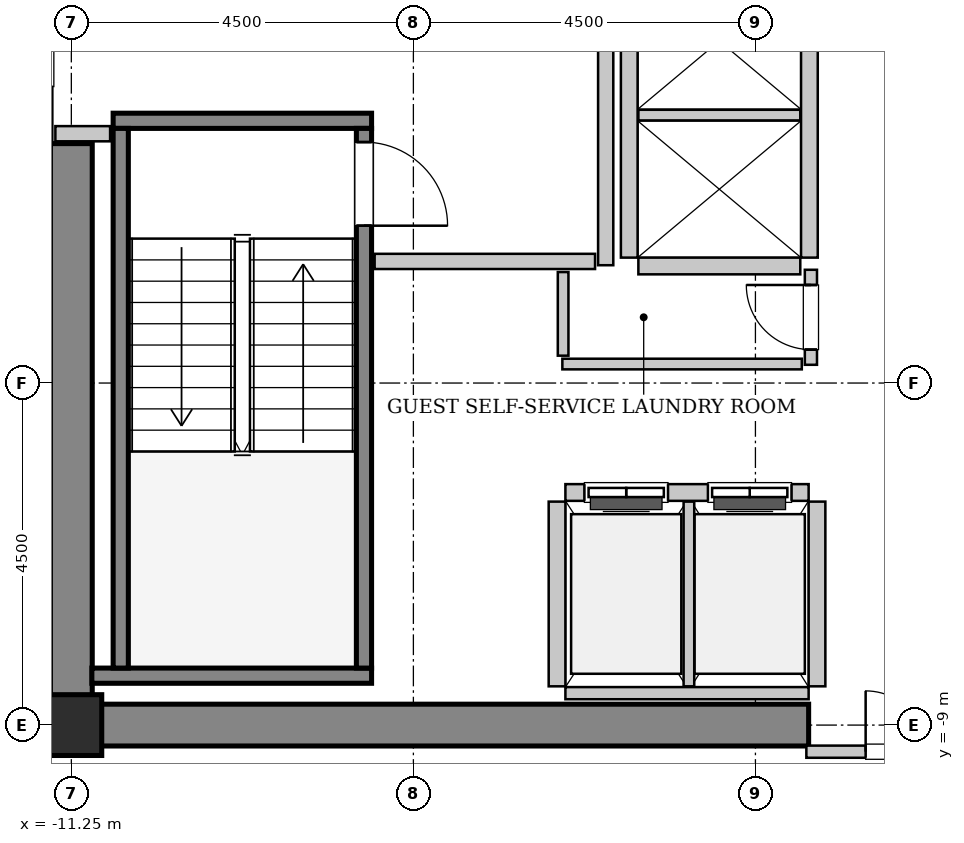
"""IFC4 building model, lengths in metres.
Left out: names, types, materials, properties, quantities, classifications, styles, units other than length and angle.
Written with IfcOpenShell. Run it as: python <this file> out.ifc"""

import sys

from ifc_helpers import new_model, si_unit, direction, frame, frame_2d, origin, origin_2d, place, context, subcontext, project, spatial, rectangle, hollow_rectangle, extrude, source, transform, mapped, element, fill, save


model = new_model("IFC4")
c1 = context("Model", 3, precision=1e-05, world=origin(), true_north=direction((0.0, 1.0)))
c2 = subcontext(c1, "Body", "Model", "MODEL_VIEW")
j1 = project(units=[si_unit("LENGTHUNIT", "METRE"), si_unit("PLANEANGLEUNIT", "RADIAN")], contexts=[c1])
p1 = place(None, origin())
s1 = spatial("IfcSite", under=j1, at=p1, CompositionType="ELEMENT")
p2 = place(p1, origin())
s2 = spatial("IfcBuilding", under=s1, at=p2, CompositionType="ELEMENT")
p3 = place(p2, frame((0.0, 0.0, 186.8)))
s3 = spatial("IfcBuildingStorey", under=s2, at=p3, CompositionType="ELEMENT", Elevation=186.8)
m1 = source(origin(), c2, "Body", "SweptSolid", [
    extrude(rectangle(XDim=9.975, YDim=0.55, at=frame_2d((4.987, 0.0))), origin(), (0.0, 0.0, 1.0), 3.8),
])
p4 = place(p3, frame((-11.525, -9.0, 0.0), z_axis=(0.0, 0.0, 1.0), x_axis=(1.0, 0.0, 0.0)))
e1 = element("IfcWall", 1, at=p4, inside=s3, PredefinedType="SHEAR", context=c2, shape_type="MappedRepresentation", body=[
    mapped(m1, transform((0.0, 0.0, 0.0), x_axis=(1.0, 0.0, 0.0), y_axis=(0.0, 1.0, 0.0), z_axis=(0.0, 0.0, 1.0), scale=1.0)),
])
m2 = source(origin(), c2, "Body", "SweptSolid", [
    extrude(rectangle(XDim=7.375, YDim=0.55, at=frame_2d((3.688, 0.0))), origin(), (0.0, 0.0, 1.0), 3.8),
])
p5 = place(p3, frame((-11.25, -8.725, 0.0), z_axis=(0.0, 0.0, 1.0), x_axis=(0.0, 1.0, 0.0)))
e2 = element("IfcWall", 2, at=p5, inside=s3, PredefinedType="SHEAR", context=c2, shape_type="MappedRepresentation", body=[
    mapped(m2, transform((0.0, 0.0, 0.0), x_axis=(1.0, 0.0, 0.0), y_axis=(0.0, 1.0, 0.0), z_axis=(0.0, 0.0, 1.0), scale=1.0)),
])
m3 = source(origin(), c2, "Body", "SweptSolid", [
    extrude(hollow_rectangle(XDim=0.8, YDim=0.8, WallThickness=0.04, InnerFilletRadius=0.04, OuterFilletRadius=0.08, at=origin_2d()), origin(), (0.0, 0.0, 1.0), 3.8),
])
p6 = place(p3, frame((-11.25, -9.0, 0.0), z_axis=(0.0, 0.0, 1.0), x_axis=(1.0, 0.0, 0.0)))
e3 = element("IfcColumn", 3, at=p6, inside=s3, PredefinedType="COLUMN", context=c2, shape_type="MappedRepresentation", body=[
    mapped(m3, transform((0.0, 0.0, 0.0), x_axis=(1.0, 0.0, 0.0), y_axis=(0.0, 1.0, 0.0), z_axis=(0.0, 0.0, 1.0), scale=1.0)),
])
m4 = source(origin(), c2, "Body", "SweptSolid", [
    extrude(rectangle(XDim=3.4, YDim=0.2, at=frame_2d((1.7, 0.0))), origin(), (0.0, 0.0, 1.0), 3.8),
])
p7 = place(p3, frame((-10.7, -1.05, 0.0), z_axis=(0.0, 0.0, 1.0), x_axis=(1.0, 0.0, 0.0)))
e4 = element("IfcWall", 4, at=p7, inside=s3, PredefinedType="SOLIDWALL", context=c2, shape_type="MappedRepresentation", body=[
    mapped(m4, transform((0.0, 0.0, 0.0), x_axis=(1.0, 0.0, 0.0), y_axis=(0.0, 1.0, 0.0), z_axis=(0.0, 0.0, 1.0), scale=1.0)),
])
m5 = source(origin(), c2, "Body", "SweptSolid", [
    extrude(rectangle(XDim=3.68, YDim=0.2, at=frame_2d((1.84, 0.0))), origin(), (0.0, 0.0, 1.0), 3.8),
])
p8 = place(p3, frame((-10.98, -8.35, 0.0), z_axis=(0.0, 0.0, 1.0), x_axis=(1.0, 0.0, 0.0)))
e5 = element("IfcWall", 5, at=p8, inside=s3, PredefinedType="SOLIDWALL", context=c2, shape_type="MappedRepresentation", body=[
    mapped(m5, transform((0.0, 0.0, 0.0), x_axis=(1.0, 0.0, 0.0), y_axis=(0.0, 1.0, 0.0), z_axis=(0.0, 0.0, 1.0), scale=1.0)),
])
m6 = source(origin(), c2, "Body", "SweptSolid", [
    extrude(rectangle(XDim=7.1, YDim=0.2, at=frame_2d((3.55, 0.0))), origin(), (0.0, 0.0, 1.0), 3.8),
])
p9 = place(p3, frame((-10.6, -1.15, 0.0), z_axis=(0.0, 0.0, 1.0), x_axis=(0.0, -1.0, 0.0)))
e6 = element("IfcWall", 6, at=p9, inside=s3, PredefinedType="SOLIDWALL", context=c2, shape_type="MappedRepresentation", body=[
    mapped(m6, transform((0.0, 0.0, 0.0), x_axis=(1.0, 0.0, 0.0), y_axis=(0.0, 1.0, 0.0), z_axis=(0.0, 0.0, 1.0), scale=1.0)),
])
p10 = place(p3, frame((-7.4, -1.15, 0.0), z_axis=(0.0, 0.0, 1.0), x_axis=(0.0, -1.0, 0.0)))
e7 = element("IfcWall", 7, at=p10, inside=s3, PredefinedType="SOLIDWALL", context=c2, shape_type="MappedRepresentation", body=[
    mapped(m6, transform((0.0, 0.0, 0.0), x_axis=(1.0, 0.0, 0.0), y_axis=(0.0, 1.0, 0.0), z_axis=(0.0, 0.0, 1.0), scale=1.0)),
])
p11 = place(p10, frame((0.18, 0.0, 0.0)))
e8 = element("IfcOpeningElement", 8, at=p11, cuts=e7, PredefinedType="OPENING", context=c2, shape_type="SweptSolid", body=[
    extrude(rectangle(XDim=1.1, YDim=2.15, at=frame_2d((0.55, 1.075))), frame((0.0, 0.11, 0.0), z_axis=(0.0, -1.0, 0.0), x_axis=(1.0, 0.0, 0.0)), (0.0, 0.0, 1.0), 0.22),
])
m7 = source(origin(), c2, "Body", "SweptSolid", [
    extrude(rectangle(XDim=3.2, YDim=0.22, at=frame_2d((1.6, 0.0))), origin(), (0.0, 0.0, 1.0), 3.535),
])
p12 = place(p3, frame((-1.55, -5.94, 0.0), z_axis=(0.0, 0.0, 1.0), x_axis=(-1.0, 0.0, 0.0)))
e9 = element("IfcWall", 9, at=p12, inside=s3, PredefinedType="SOLIDWALL", context=c2, shape_type="MappedRepresentation", body=[
    mapped(m7, transform((0.0, 0.0, 0.0), x_axis=(1.0, 0.0, 0.0), y_axis=(0.0, 1.0, 0.0), z_axis=(0.0, 0.0, 1.0), scale=1.0)),
])
p13 = place(p12, frame((1.85, 0.0, 0.0)))
e10 = element("IfcOpeningElement", 10, at=p13, cuts=e9, PredefinedType="OPENING", context=c2, shape_type="SweptSolid", body=[
    extrude(rectangle(XDim=1.1, YDim=2.2, at=frame_2d((0.55, 1.1))), frame((0.0, 0.12, 0.0), z_axis=(0.0, -1.0, 0.0), x_axis=(1.0, 0.0, 0.0)), (0.0, 0.0, 1.0), 0.24),
])
p14 = place(p12, frame((0.225, 0.0, 0.0)))
e11 = element("IfcOpeningElement", 11, at=p14, cuts=e9, PredefinedType="OPENING", context=c2, shape_type="SweptSolid", body=[
    extrude(rectangle(XDim=1.1, YDim=2.2, at=frame_2d((0.55, 1.1))), frame((0.0, 0.12, 0.0), z_axis=(0.0, -1.0, 0.0), x_axis=(1.0, 0.0, 0.0)), (0.0, 0.0, 1.0), 0.24),
])
m8 = source(origin(), c2, "Body", "SweptSolid", [
    extrude(rectangle(XDim=3.2, YDim=0.16, at=frame_2d((1.6, 0.0))), origin(), (0.0, 0.0, 1.0), 2.425),
])
p15 = place(p3, frame((-4.75, -8.58, 0.0), z_axis=(0.0, 0.0, 1.0), x_axis=(1.0, 0.0, 0.0)))
e12 = element("IfcWall", 12, at=p15, inside=s3, PredefinedType="PARTITIONING", context=c2, shape_type="MappedRepresentation", body=[
    mapped(m8, transform((0.0, 0.0, 0.0), x_axis=(1.0, 0.0, 0.0), y_axis=(0.0, 1.0, 0.0), z_axis=(0.0, 0.0, 1.0), scale=1.0)),
])
m9 = source(origin(), c2, "Body", "SweptSolid", [
    extrude(rectangle(XDim=2.43, YDim=0.22, at=frame_2d((1.215, 0.0))), origin(), (0.0, 0.0, 1.0), 3.535),
])
p16 = place(p3, frame((-4.86, -6.06, 0.0), z_axis=(0.0, 0.0, 1.0), x_axis=(0.0, -1.0, 0.0)))
e13 = element("IfcWall", 13, at=p16, inside=s3, PredefinedType="SOLIDWALL", context=c2, shape_type="MappedRepresentation", body=[
    mapped(m9, transform((0.0, 0.0, 0.0), x_axis=(1.0, 0.0, 0.0), y_axis=(0.0, 1.0, 0.0), z_axis=(0.0, 0.0, 1.0), scale=1.0)),
])
m10 = source(origin(), c2, "Body", "SweptSolid", [
    extrude(rectangle(XDim=2.43, YDim=0.14, at=frame_2d((1.215, 0.0))), origin(), (0.0, 0.0, 1.0), 3.535),
])
p17 = place(p3, frame((-3.125, -8.49, 0.0), z_axis=(0.0, 0.0, 1.0), x_axis=(0.0, 1.0, 0.0)))
e14 = element("IfcWall", 14, at=p17, inside=s3, PredefinedType="PARTITIONING", context=c2, shape_type="MappedRepresentation", body=[
    mapped(m10, transform((0.0, 0.0, 0.0), x_axis=(1.0, 0.0, 0.0), y_axis=(0.0, 1.0, 0.0), z_axis=(0.0, 0.0, 1.0), scale=1.0)),
])
p18 = place(p3, frame((-1.44, -8.49, 0.0), z_axis=(0.0, 0.0, 1.0), x_axis=(0.0, 1.0, 0.0)))
e15 = element("IfcWall", 15, at=p18, inside=s3, PredefinedType="SOLIDWALL", context=c2, shape_type="MappedRepresentation", body=[
    mapped(m9, transform((0.0, 0.0, 0.0), x_axis=(1.0, 0.0, 0.0), y_axis=(0.0, 1.0, 0.0), z_axis=(0.0, 0.0, 1.0), scale=1.0)),
])
m11 = source(origin(), c2, "Body", "SweptSolid", [
    extrude(rectangle(XDim=5.7, YDim=0.22, at=frame_2d((2.85, 0.0))), origin(), (0.0, 0.0, 1.0), 3.535),
])
for number, where, z_axis, x_axis in (
    (16, (-1.54, -2.85, 0.0), (0.0, 0.0, 1.0), (0.0, 1.0, 0.0)),
    (17, (-3.91, 2.85, 0.0), (0.0, 0.0, 1.0), (0.0, -1.0, 0.0)),
):
    element("IfcWall", number, at=place(p3, frame(where, z_axis=z_axis, x_axis=x_axis)), inside=s3, PredefinedType="SOLIDWALL", context=c2, shape_type="MappedRepresentation", body=[
        mapped(m11, transform((0.0, 0.0, 0.0), x_axis=(1.0, 0.0, 0.0), y_axis=(0.0, 1.0, 0.0), z_axis=(0.0, 0.0, 1.0), scale=1.0)),
    ])
m12 = source(origin(), c2, "Body", "SweptSolid", [
    extrude(rectangle(XDim=2.13, YDim=0.22, at=frame_2d((1.065, 0.0))), origin(), (0.0, 0.0, 1.0), 3.535),
])
p19 = place(p3, frame((-3.79, -2.96, 0.0), z_axis=(0.0, 0.0, 1.0), x_axis=(1.0, 0.0, 0.0)))
e18 = element("IfcWall", 18, at=p19, inside=s3, PredefinedType="SOLIDWALL", context=c2, shape_type="MappedRepresentation", body=[
    mapped(m12, transform((0.0, 0.0, 0.0), x_axis=(1.0, 0.0, 0.0), y_axis=(0.0, 1.0, 0.0), z_axis=(0.0, 0.0, 1.0), scale=1.0)),
])
m13 = source(origin(), c2, "Body", "SweptSolid", [
    extrude(rectangle(XDim=2.13, YDim=0.14, at=frame_2d((1.065, 0.0))), origin(), (0.0, 0.0, 1.0), 3.535),
])
p20 = place(p3, frame((-3.79, -0.975, 0.0), z_axis=(0.0, 0.0, 1.0), x_axis=(1.0, 0.0, 0.0)))
e19 = element("IfcWall", 19, at=p20, inside=s3, PredefinedType="PARTITIONING", context=c2, shape_type="MappedRepresentation", body=[
    mapped(m13, transform((0.0, 0.0, 0.0), x_axis=(1.0, 0.0, 0.0), y_axis=(0.0, 1.0, 0.0), z_axis=(0.0, 0.0, 1.0), scale=1.0)),
])
m14 = source(origin(), c2, "Body", "SweptSolid", [
    extrude(rectangle(XDim=5.9, YDim=0.2, at=frame_2d((2.95, 0.0))), origin(), (0.0, 0.0, 1.0), 3.535),
])
p21 = place(p3, frame((-4.22, -2.95, 0.0), z_axis=(0.0, 0.0, 1.0), x_axis=(0.0, 1.0, 0.0)))
e20 = element("IfcWall", 20, at=p21, inside=s3, PredefinedType="PARTITIONING", context=c2, shape_type="MappedRepresentation", body=[
    mapped(m14, transform((0.0, 0.0, 0.0), x_axis=(1.0, 0.0, 0.0), y_axis=(0.0, 1.0, 0.0), z_axis=(0.0, 0.0, 1.0), scale=1.0)),
])
m15 = source(origin(), c2, "Body", "SweptSolid", [
    extrude(rectangle(XDim=2.9, YDim=0.2, at=frame_2d((1.45, 0.0))), origin(), (0.0, 0.0, 1.0), 3.535),
])
p22 = place(p3, frame((-7.26, -2.9, 0.0), z_axis=(0.0, 0.0, 1.0), x_axis=(1.0, 0.0, 0.0)))
e21 = element("IfcWall", 21, at=p22, inside=s3, PredefinedType="PARTITIONING", context=c2, shape_type="MappedRepresentation", body=[
    mapped(m15, transform((0.0, 0.0, 0.0), x_axis=(1.0, 0.0, 0.0), y_axis=(0.0, 1.0, 0.0), z_axis=(0.0, 0.0, 1.0), scale=1.0)),
])
m16 = source(origin(), c2, "Body", "SweptSolid", [
    extrude(rectangle(XDim=0.72, YDim=0.2, at=frame_2d((0.36, 0.0))), origin(), (0.0, 0.0, 1.0), 3.535),
])
p23 = place(p3, frame((-11.46, -1.22, 0.0), z_axis=(0.0, 0.0, 1.0), x_axis=(1.0, 0.0, 0.0)))
e22 = element("IfcWall", 22, at=p23, inside=s3, PredefinedType="PARTITIONING", context=c2, shape_type="MappedRepresentation", body=[
    mapped(m16, transform((0.0, 0.0, 0.0), x_axis=(1.0, 0.0, 0.0), y_axis=(0.0, 1.0, 0.0), z_axis=(0.0, 0.0, 1.0), scale=1.0)),
])
m17 = source(origin(), c2, "Body", "SweptSolid", [
    extrude(rectangle(XDim=3.16, YDim=0.16, at=frame_2d((1.58, 0.0))), origin(), (0.0, 0.0, 1.0), 2.425),
])
p24 = place(p3, frame((-1.58, -9.35, 0.0), z_axis=(0.0, 0.0, 1.0), x_axis=(1.0, 0.0, 0.0)))
e23 = element("IfcWall", 23, at=p24, inside=s3, PredefinedType="PARTITIONING", context=c2, shape_type="MappedRepresentation", body=[
    mapped(m17, transform((0.0, 0.0, 0.0), x_axis=(1.0, 0.0, 0.0), y_axis=(0.0, 1.0, 0.0), z_axis=(0.0, 0.0, 1.0), scale=1.0)),
])
p25 = place(p24, frame((0.78, 0.0, 0.0)))
e24 = element("IfcOpeningElement", 24, at=p25, cuts=e23, PredefinedType="OPENING", context=c2, shape_type="SweptSolid", body=[
    extrude(rectangle(XDim=1.6, YDim=2.3, at=frame_2d((0.8, 1.15))), frame((0.0, 0.09, 0.0), z_axis=(0.0, -1.0, 0.0), x_axis=(1.0, 0.0, 0.0)), (0.0, 0.0, 1.0), 0.18),
])
m18 = source(origin(), c2, "Body", "SweptSolid", [
    extrude(rectangle(XDim=1.25, YDim=0.16, at=frame_2d((0.625, 0.0))), origin(), (0.0, 0.0, 1.0), 3.535),
])
p26 = place(p3, frame((-1.52, -4.26, 0.0), z_axis=(0.0, 0.0, 1.0), x_axis=(0.0, 1.0, 0.0)))
e25 = element("IfcWall", 25, at=p26, inside=s3, PredefinedType="PARTITIONING", context=c2, shape_type="MappedRepresentation", body=[
    mapped(m18, transform((0.0, 0.0, 0.0), x_axis=(1.0, 0.0, 0.0), y_axis=(0.0, 1.0, 0.0), z_axis=(0.0, 0.0, 1.0), scale=1.0)),
])
p27 = place(p26, frame((0.2, 0.0, 0.0)))
e26 = element("IfcOpeningElement", 26, at=p27, cuts=e25, PredefinedType="OPENING", context=c2, shape_type="SweptSolid", body=[
    extrude(rectangle(XDim=0.85, YDim=2.1, at=frame_2d((0.425, 1.05))), frame((0.0, 0.09, 0.0), z_axis=(0.0, -1.0, 0.0), x_axis=(1.0, 0.0, 0.0)), (0.0, 0.0, 1.0), 0.18),
])
m19 = source(origin(), c2, "Body", "SweptSolid", [
    extrude(rectangle(XDim=3.15, YDim=0.14, at=frame_2d((1.575, 0.0))), origin(), (0.0, 0.0, 1.0), 3.535),
])
p28 = place(p3, frame((-4.79, -4.25, 0.0), z_axis=(0.0, 0.0, 1.0), x_axis=(1.0, 0.0, 0.0)))
e27 = element("IfcWall", 27, at=p28, inside=s3, PredefinedType="PARTITIONING", context=c2, shape_type="MappedRepresentation", body=[
    mapped(m19, transform((0.0, 0.0, 0.0), x_axis=(1.0, 0.0, 0.0), y_axis=(0.0, 1.0, 0.0), z_axis=(0.0, 0.0, 1.0), scale=1.0)),
])
m20 = source(origin(), c2, "Body", "SweptSolid", [
    extrude(rectangle(XDim=1.1, YDim=0.14, at=frame_2d((0.55, 0.0))), origin(), (0.0, 0.0, 1.0), 3.535),
])
p29 = place(p3, frame((-4.78, -4.14, 0.0), z_axis=(0.0, 0.0, 1.0), x_axis=(0.0, 1.0, 0.0)))
e28 = element("IfcWall", 28, at=p29, inside=s3, PredefinedType="PARTITIONING", context=c2, shape_type="MappedRepresentation", body=[
    mapped(m20, transform((0.0, 0.0, 0.0), x_axis=(1.0, 0.0, 0.0), y_axis=(0.0, 1.0, 0.0), z_axis=(0.0, 0.0, 1.0), scale=1.0)),
])
m21 = source(origin(), c2, "Body", "SweptSolid", [
    extrude(rectangle(XDim=1.1, YDim=2.15, at=frame_2d((0.55, 1.075))), frame((0.0, 0.025, 0.0), z_axis=(0.0, -1.0, 0.0), x_axis=(1.0, 0.0, 0.0)), (0.0, 0.0, 1.0), 0.05),
])
p30 = place(p11, origin())
e29 = element("IfcDoor", 29, at=p30, inside=s3, OperationType="SINGLE_SWING_RIGHT", PredefinedType="DOOR", context=c2, shape_type="MappedRepresentation", body=[
    mapped(m21, transform((0.0, 0.0, 0.0), x_axis=(1.0, 0.0, 0.0), y_axis=(0.0, 1.0, 0.0), z_axis=(0.0, 0.0, 1.0), scale=1.0)),
])
fill(e8, e29)
m22 = source(origin(), c2, "Body", "SweptSolid", [
    extrude(rectangle(XDim=1.1, YDim=2.2, at=frame_2d((0.55, 1.1))), frame((0.0, 0.025, 0.0), z_axis=(0.0, -1.0, 0.0), x_axis=(1.0, 0.0, 0.0)), (0.0, 0.0, 1.0), 0.05),
])
p31 = place(p13, origin())
e30 = element("IfcDoor", 30, at=p31, inside=s3, OperationType="DOUBLE_DOOR_SLIDING", PredefinedType="DOOR", context=c2, shape_type="MappedRepresentation", body=[
    mapped(m22, transform((0.0, 0.0, 0.0), x_axis=(1.0, 0.0, 0.0), y_axis=(0.0, 1.0, 0.0), z_axis=(0.0, 0.0, 1.0), scale=1.0)),
])
fill(e10, e30)
p32 = place(p14, origin())
e31 = element("IfcDoor", 31, at=p32, inside=s3, OperationType="DOUBLE_DOOR_SLIDING", PredefinedType="DOOR", context=c2, shape_type="MappedRepresentation", body=[
    mapped(m22, transform((0.0, 0.0, 0.0), x_axis=(1.0, 0.0, 0.0), y_axis=(0.0, 1.0, 0.0), z_axis=(0.0, 0.0, 1.0), scale=1.0)),
])
fill(e11, e31)
m23 = source(origin(), c2, "Body", "SweptSolid", [
    extrude(rectangle(XDim=1.6, YDim=2.3, at=frame_2d((0.8, 1.15))), frame((0.0, 0.025, 0.0), z_axis=(0.0, -1.0, 0.0), x_axis=(1.0, 0.0, 0.0)), (0.0, 0.0, 1.0), 0.05),
])
p33 = place(p25, origin())
e32 = element("IfcDoor", 32, at=p33, inside=s3, OperationType="DOUBLE_DOOR_SINGLE_SWING", PredefinedType="DOOR", context=c2, shape_type="MappedRepresentation", body=[
    mapped(m23, transform((0.0, 0.0, 0.0), x_axis=(1.0, 0.0, 0.0), y_axis=(0.0, 1.0, 0.0), z_axis=(0.0, 0.0, 1.0), scale=1.0)),
])
fill(e24, e32)
m24 = source(origin(), c2, "Body", "SweptSolid", [
    extrude(rectangle(XDim=0.85, YDim=2.1, at=frame_2d((0.425, 1.05))), frame((0.0, 0.025, 0.0), z_axis=(0.0, -1.0, 0.0), x_axis=(1.0, 0.0, 0.0)), (0.0, 0.0, 1.0), 0.05),
])
p34 = place(p27, origin())
e33 = element("IfcDoor", 33, at=p34, inside=s3, OperationType="SINGLE_SWING_RIGHT", PredefinedType="DOOR", context=c2, shape_type="MappedRepresentation", body=[
    mapped(m24, transform((0.0, 0.0, 0.0), x_axis=(1.0, 0.0, 0.0), y_axis=(0.0, 1.0, 0.0), z_axis=(0.0, 0.0, 1.0), scale=1.0)),
])
fill(e26, e33)
save(model, sys.argv[1])
